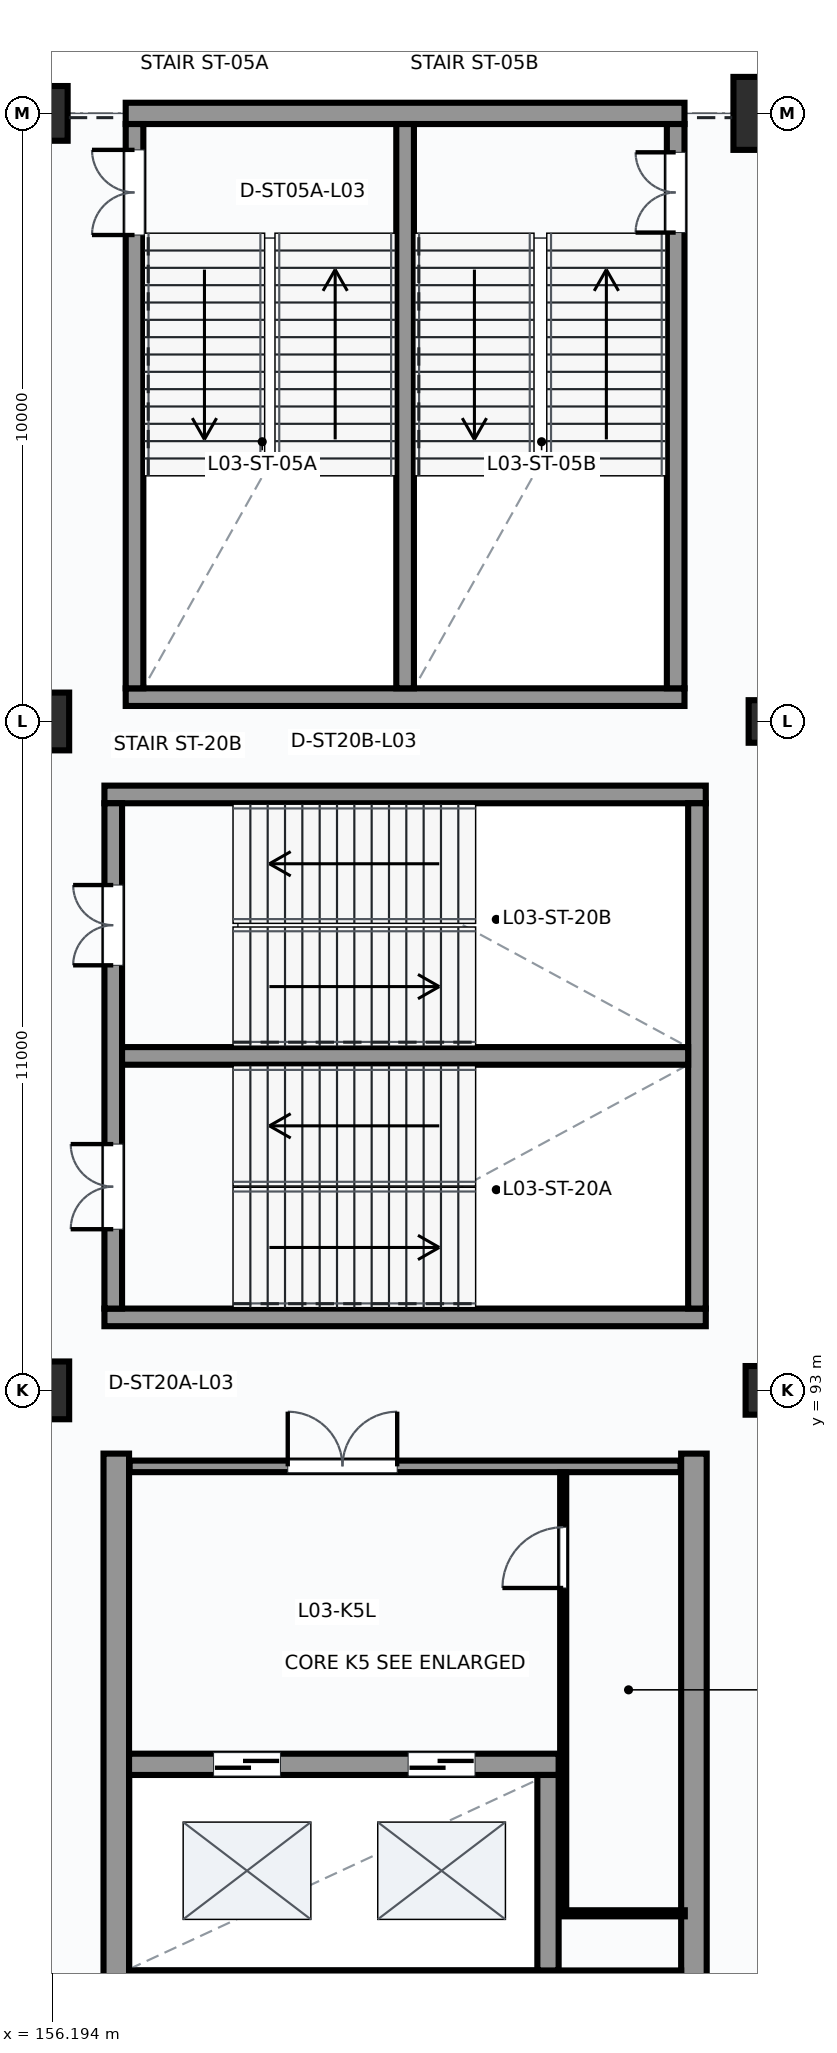
"""IFC4 building model, lengths in metres.
Left out: names, types, materials, properties, quantities, classifications, styles, units other than length and angle.
Written with IfcOpenShell. Run it as: python <this file> out.ifc"""

import sys

from ifc_helpers import new_model, si_unit, direction, frame, frame_2d, origin, origin_2d, place, context, subcontext, project, spatial, rectangle, circle, extrude, element, fill, save


model = new_model("IFC4")
c1 = context("Model", 3, precision=1e-05, world=origin(), true_north=direction((0.0, 1.0)))
c2 = subcontext(c1, "Body", "Model", "MODEL_VIEW")
j1 = project(units=[si_unit("LENGTHUNIT", "METRE"), si_unit("PLANEANGLEUNIT", "RADIAN")], contexts=[c1])
p1 = place(None, origin())
s1 = spatial("IfcSite", under=j1, at=p1, CompositionType="ELEMENT")
p2 = place(p1, origin())
s2 = spatial("IfcBuilding", under=s1, at=p2, CompositionType="ELEMENT")
p3 = place(p2, frame((0.0, 0.0, 14.7)))
s3 = spatial("IfcBuildingStorey", under=s2, at=p3, CompositionType="ELEMENT", Elevation=14.7)
for number, where, z_axis, x_axis in (
    (1, (156.0, 93.0, 0.0), (0.0, 0.0, 1.0), (1.0, 0.0, 0.0)),
    (2, (156.0, 104.0, 0.0), (0.0, 0.0, 1.0), (1.0, 0.0, 0.0)),
):
    element("IfcColumn", number, at=place(p3, frame(where, z_axis=z_axis, x_axis=x_axis)), inside=s3, PredefinedType="COLUMN", context=c2, shape_type="SweptSolid", body=[
        extrude(rectangle(XDim=0.95, YDim=0.95, at=origin_2d()), origin(), (0.0, 0.0, 1.0), 4.5),
    ])
p4 = place(p3, frame((156.0, 114.0, 0.0), z_axis=(0.0, 0.0, 1.0), x_axis=(1.0, 0.0, 0.0)))
e3 = element("IfcColumn", 3, at=p4, inside=s3, PredefinedType="COLUMN", context=c2, shape_type="SweptSolid", body=[
    extrude(circle(Radius=0.45, at=origin_2d()), origin(), (0.0, 0.0, 1.0), 4.5),
])
p5 = place(p3, frame((168.0, 93.0, 0.0), z_axis=(0.0, 0.0, 1.0), x_axis=(1.0, 0.0, 0.0)))
e4 = element("IfcColumn", 4, at=p5, inside=s3, PredefinedType="COLUMN", context=c2, shape_type="SweptSolid", body=[
    extrude(circle(Radius=0.4, at=origin_2d()), origin(), (0.0, 0.0, 1.0), 4.5),
])
p6 = place(p3, frame((168.0, 104.0, 0.0), z_axis=(0.0, 0.0, 1.0), x_axis=(1.0, 0.0, 0.0)))
e5 = element("IfcColumn", 5, at=p6, inside=s3, PredefinedType="COLUMN", context=c2, shape_type="SweptSolid", body=[
    extrude(circle(Radius=0.35, at=origin_2d()), origin(), (0.0, 0.0, 1.0), 4.5),
])
p7 = place(p3, frame((168.0, 114.0, 0.0), z_axis=(0.0, 0.0, 1.0), x_axis=(1.0, 0.0, 0.0)))
e6 = element("IfcColumn", 6, at=p7, inside=s3, PredefinedType="COLUMN", context=c2, shape_type="SweptSolid", body=[
    extrude(rectangle(XDim=1.2, YDim=1.2, at=origin_2d()), origin(), (0.0, 0.0, 1.0), 4.5),
])
p8 = place(p3, frame((157.405, 104.4, 0.0), z_axis=(0.0, 0.0, 1.0), x_axis=(1.0, 0.0, 0.0)))
e7 = element("IfcWall", 7, at=p8, inside=s3, PredefinedType="SHEAR", context=c2, shape_type="SweptSolid", body=[
    extrude(rectangle(XDim=9.19, YDim=0.29, at=frame_2d((4.595, 0.0))), origin(), (0.0, 0.0, 1.0), 4.5),
])
p9 = place(p3, frame((157.405, 114.0, 0.0), z_axis=(0.0, 0.0, 1.0), x_axis=(1.0, 0.0, 0.0)))
e8 = element("IfcWall", 8, at=p9, inside=s3, PredefinedType="SHEAR", context=c2, shape_type="SweptSolid", body=[
    extrude(rectangle(XDim=9.19, YDim=0.35, at=frame_2d((4.595, 0.0))), origin(), (0.0, 0.0, 1.0), 3.447),
])
p10 = place(p3, frame((157.55, 104.545, 0.0), z_axis=(0.0, 0.0, 1.0), x_axis=(0.0, 1.0, 0.0)))
e9 = element("IfcWall", 9, at=p10, inside=s3, PredefinedType="SHEAR", context=c2, shape_type="SweptSolid", body=[
    extrude(rectangle(XDim=9.28, YDim=0.29, at=frame_2d((4.64, 0.0))), origin(), (0.0, 0.0, 1.0), 4.5),
])
p11 = place(p10, frame((7.455, 0.0, 0.0)))
e10 = element("IfcOpeningElement", 10, at=p11, cuts=e9, PredefinedType="OPENING", context=c2, shape_type="SweptSolid", body=[
    extrude(rectangle(XDim=1.4, YDim=2.2, at=frame_2d((0.7, 1.1))), frame((0.0, 0.155, 0.0), z_axis=(0.0, -1.0, 0.0), x_axis=(1.0, 0.0, 0.0)), (0.0, 0.0, 1.0), 0.31),
])
p12 = place(p3, frame((166.45, 104.545, 0.0), z_axis=(0.0, 0.0, 1.0), x_axis=(0.0, 1.0, 0.0)))
e11 = element("IfcWall", 11, at=p12, inside=s3, PredefinedType="SHEAR", context=c2, shape_type="SweptSolid", body=[
    extrude(rectangle(XDim=9.28, YDim=0.29, at=frame_2d((4.64, 0.0))), origin(), (0.0, 0.0, 1.0), 4.5),
])
p13 = place(p12, frame((7.495, 0.0, 0.0)))
e12 = element("IfcOpeningElement", 12, at=p13, cuts=e11, PredefinedType="OPENING", context=c2, shape_type="SweptSolid", body=[
    extrude(rectangle(XDim=1.32, YDim=2.2, at=frame_2d((0.66, 1.1))), frame((0.0, 0.155, 0.0), z_axis=(0.0, -1.0, 0.0), x_axis=(1.0, 0.0, 0.0)), (0.0, 0.0, 1.0), 0.31),
])
p14 = place(p3, frame((162.0, 104.545, 0.0), z_axis=(0.0, 0.0, 1.0), x_axis=(0.0, 1.0, 0.0)))
e13 = element("IfcWall", 13, at=p14, inside=s3, PredefinedType="SHEAR", context=c2, shape_type="SweptSolid", body=[
    extrude(rectangle(XDim=9.28, YDim=0.29, at=frame_2d((4.64, 0.0))), origin(), (0.0, 0.0, 1.0), 4.5),
])
for number, where, z_axis, x_axis in (
    (14, (157.055, 94.2, 0.0), (0.0, 0.0, 1.0), (1.0, 0.0, 0.0)),
    (15, (157.055, 102.8, 0.0), (0.0, 0.0, 1.0), (1.0, 0.0, 0.0)),
):
    element("IfcWall", number, at=place(p3, frame(where, z_axis=z_axis, x_axis=x_axis)), inside=s3, PredefinedType="SHEAR", context=c2, shape_type="SweptSolid", body=[
        extrude(rectangle(XDim=9.89, YDim=0.29, at=frame_2d((4.945, 0.0))), origin(), (0.0, 0.0, 1.0), 4.5),
    ])
p15 = place(p3, frame((157.2, 94.345, 0.0), z_axis=(0.0, 0.0, 1.0), x_axis=(0.0, 1.0, 0.0)))
e16 = element("IfcWall", 16, at=p15, inside=s3, PredefinedType="SHEAR", context=c2, shape_type="SweptSolid", body=[
    extrude(rectangle(XDim=8.31, YDim=0.29, at=frame_2d((4.155, 0.0))), origin(), (0.0, 0.0, 1.0), 4.5),
])
p16 = place(p15, frame((1.305, 0.0, 0.0)))
e17 = element("IfcOpeningElement", 17, at=p16, cuts=e16, PredefinedType="OPENING", context=c2, shape_type="SweptSolid", body=[
    extrude(rectangle(XDim=1.4, YDim=2.2, at=frame_2d((0.7, 1.1))), frame((0.0, 0.155, 0.0), z_axis=(0.0, -1.0, 0.0), x_axis=(1.0, 0.0, 0.0)), (0.0, 0.0, 1.0), 0.31),
])
p17 = place(p15, frame((5.645, 0.0, 0.0)))
e18 = element("IfcOpeningElement", 18, at=p17, cuts=e16, PredefinedType="OPENING", context=c2, shape_type="SweptSolid", body=[
    extrude(rectangle(XDim=1.32, YDim=2.2, at=frame_2d((0.66, 1.1))), frame((0.0, 0.155, 0.0), z_axis=(0.0, -1.0, 0.0), x_axis=(1.0, 0.0, 0.0)), (0.0, 0.0, 1.0), 0.31),
])
p18 = place(p3, frame((166.8, 94.345, 0.0), z_axis=(0.0, 0.0, 1.0), x_axis=(0.0, 1.0, 0.0)))
e19 = element("IfcWall", 19, at=p18, inside=s3, PredefinedType="SHEAR", context=c2, shape_type="SweptSolid", body=[
    extrude(rectangle(XDim=8.31, YDim=0.29, at=frame_2d((4.155, 0.0))), origin(), (0.0, 0.0, 1.0), 4.5),
])
p19 = place(p3, frame((157.345, 98.5, 0.0), z_axis=(0.0, 0.0, 1.0), x_axis=(1.0, 0.0, 0.0)))
e20 = element("IfcWall", 20, at=p19, inside=s3, PredefinedType="SHEAR", context=c2, shape_type="SweptSolid", body=[
    extrude(rectangle(XDim=9.31, YDim=0.29, at=frame_2d((4.655, 0.0))), origin(), (0.0, 0.0, 1.0), 4.5),
])
for number, where, z_axis, x_axis in (
    (21, (157.25, 83.04, 0.0), (0.0, 0.0, 1.0), (0.0, 1.0, 0.0)),
    (22, (166.75, 83.04, 0.0), (0.0, 0.0, 1.0), (0.0, 1.0, 0.0)),
):
    element("IfcWall", number, at=place(p3, frame(where, z_axis=z_axis, x_axis=x_axis)), inside=s3, PredefinedType="SHEAR", context=c2, shape_type="SweptSolid", body=[
        extrude(rectangle(XDim=8.92, YDim=0.42, at=frame_2d((4.46, 0.0))), origin(), (0.0, 0.0, 1.0), 4.5),
    ])
p20 = place(p3, frame((157.46, 83.25, 0.0), z_axis=(0.0, 0.0, 1.0), x_axis=(1.0, 0.0, 0.0)))
e23 = element("IfcWall", 23, at=p20, inside=s3, PredefinedType="SHEAR", context=c2, shape_type="SweptSolid", body=[
    extrude(rectangle(XDim=9.08, YDim=0.42, at=frame_2d((4.54, 0.0))), origin(), (0.0, 0.0, 1.0), 4.5),
])
p21 = place(p3, frame((157.46, 86.85, 0.0), z_axis=(0.0, 0.0, 1.0), x_axis=(1.0, 0.0, 0.0)))
e24 = element("IfcWall", 24, at=p21, inside=s3, PredefinedType="SHEAR", context=c2, shape_type="SweptSolid", body=[
    extrude(rectangle(XDim=7.065, YDim=0.35, at=frame_2d((3.532, 0.0))), origin(), (0.0, 0.0, 1.0), 4.5),
])
p22 = place(p21, frame((1.39, 0.0, 0.0)))
e25 = element("IfcOpeningElement", 25, at=p22, cuts=e24, PredefinedType="OPENING", context=c2, shape_type="SweptSolid", body=[
    extrude(rectangle(XDim=1.1, YDim=2.2, at=frame_2d((0.55, 1.1))), frame((0.0, 0.185, 0.0), z_axis=(0.0, -1.0, 0.0), x_axis=(1.0, 0.0, 0.0)), (0.0, 0.0, 1.0), 0.37),
])
p23 = place(p21, frame((4.59, 0.0, 0.0)))
e26 = element("IfcOpeningElement", 26, at=p23, cuts=e24, PredefinedType="OPENING", context=c2, shape_type="SweptSolid", body=[
    extrude(rectangle(XDim=1.1, YDim=2.2, at=frame_2d((0.55, 1.1))), frame((0.0, 0.185, 0.0), z_axis=(0.0, -1.0, 0.0), x_axis=(1.0, 0.0, 0.0)), (0.0, 0.0, 1.0), 0.37),
])
p24 = place(p3, frame((164.35, 83.46, 0.0), z_axis=(0.0, 0.0, 1.0), x_axis=(0.0, 1.0, 0.0)))
e27 = element("IfcWall", 27, at=p24, inside=s3, PredefinedType="SHEAR", context=c2, shape_type="SweptSolid", body=[
    extrude(rectangle(XDim=3.215, YDim=0.35, at=frame_2d((1.607, 0.0))), origin(), (0.0, 0.0, 1.0), 4.5),
])
p25 = place(p3, frame((157.47, 91.75, 0.0), z_axis=(0.0, 0.0, 1.0), x_axis=(1.0, 0.0, 0.0)))
e28 = element("IfcWall", 28, at=p25, inside=s3, PredefinedType="PARTITIONING", context=c2, shape_type="SweptSolid", body=[
    extrude(rectangle(XDim=9.06, YDim=0.19, at=frame_2d((4.53, 0.0))), origin(), (0.0, 0.0, 1.0), 4.16),
])
p26 = place(p25, frame((2.6, 0.0, 0.0)))
e29 = element("IfcOpeningElement", 29, at=p26, cuts=e28, PredefinedType="OPENING", context=c2, shape_type="SweptSolid", body=[
    extrude(rectangle(XDim=1.8, YDim=2.3, at=frame_2d((0.9, 1.15))), frame((0.0, 0.105, 0.0), z_axis=(0.0, -1.0, 0.0), x_axis=(1.0, 0.0, 0.0)), (0.0, 0.0, 1.0), 0.21),
])
p27 = place(p3, frame((164.6, 84.4, 0.0), z_axis=(0.0, 0.0, 1.0), x_axis=(0.0, 1.0, 0.0)))
e30 = element("IfcWall", 30, at=p27, inside=s3, PredefinedType="PARTITIONING", context=c2, shape_type="SweptSolid", body=[
    extrude(rectangle(XDim=7.25, YDim=0.1, at=frame_2d((3.625, 0.0))), origin(), (0.0, 0.0, 1.0), 4.16),
])
p28 = place(p27, frame((5.35, 0.0, 0.0)))
e31 = element("IfcOpeningElement", 31, at=p28, cuts=e30, PredefinedType="OPENING", context=c2, shape_type="SweptSolid", body=[
    extrude(rectangle(XDim=1.0, YDim=2.1, at=frame_2d((0.5, 1.05))), frame((0.0, 0.06, 0.0), z_axis=(0.0, -1.0, 0.0), x_axis=(1.0, 0.0, 0.0)), (0.0, 0.0, 1.0), 0.12),
])
p29 = place(p3, frame((164.6, 84.4, 0.0), z_axis=(0.0, 0.0, 1.0), x_axis=(1.0, 0.0, 0.0)))
e32 = element("IfcWall", 32, at=p29, inside=s3, PredefinedType="PARTITIONING", context=c2, shape_type="SweptSolid", body=[
    extrude(rectangle(XDim=2.0, YDim=0.1, at=frame_2d((1.0, 0.0))), origin(), (0.0, 0.0, 1.0), 4.16),
])
p30 = place(p11, frame((1.4, 0.0, 0.0), z_axis=(0.0, 0.0, 1.0), x_axis=(-1.0, 0.0, 0.0)))
e33 = element("IfcDoor", 33, at=p30, inside=s3, OperationType="DOUBLE_DOOR_SINGLE_SWING", PredefinedType="DOOR", context=c2, shape_type="SweptSolid", body=[
    extrude(rectangle(XDim=1.4, YDim=2.2, at=frame_2d((0.7, 1.1))), frame((0.0, 0.025, 0.0), z_axis=(0.0, -1.0, 0.0), x_axis=(1.0, 0.0, 0.0)), (0.0, 0.0, 1.0), 0.05),
])
fill(e10, e33)
p31 = place(p13, origin())
e34 = element("IfcDoor", 34, at=p31, inside=s3, OperationType="DOUBLE_DOOR_SINGLE_SWING", PredefinedType="DOOR", context=c2, shape_type="SweptSolid", body=[
    extrude(rectangle(XDim=1.32, YDim=2.2, at=frame_2d((0.66, 1.1))), frame((0.0, 0.025, 0.0), z_axis=(0.0, -1.0, 0.0), x_axis=(1.0, 0.0, 0.0)), (0.0, 0.0, 1.0), 0.05),
])
fill(e12, e34)
p32 = place(p16, origin())
e35 = element("IfcDoor", 35, at=p32, inside=s3, OperationType="DOUBLE_DOOR_SINGLE_SWING", PredefinedType="DOOR", context=c2, shape_type="SweptSolid", body=[
    extrude(rectangle(XDim=1.4, YDim=2.2, at=frame_2d((0.7, 1.1))), frame((0.0, 0.025, 0.0), z_axis=(0.0, -1.0, 0.0), x_axis=(1.0, 0.0, 0.0)), (0.0, 0.0, 1.0), 0.05),
])
fill(e17, e35)
p33 = place(p17, origin())
e36 = element("IfcDoor", 36, at=p33, inside=s3, OperationType="DOUBLE_DOOR_SINGLE_SWING", PredefinedType="DOOR", context=c2, shape_type="SweptSolid", body=[
    extrude(rectangle(XDim=1.32, YDim=2.2, at=frame_2d((0.66, 1.1))), frame((0.0, 0.025, 0.0), z_axis=(0.0, -1.0, 0.0), x_axis=(1.0, 0.0, 0.0)), (0.0, 0.0, 1.0), 0.05),
])
fill(e18, e36)
p34 = place(p22, origin())
e37 = element("IfcDoor", 37, at=p34, inside=s3, OperationType="SLIDING_TO_LEFT", PredefinedType="DOOR", context=c2, shape_type="SweptSolid", body=[
    extrude(rectangle(XDim=1.1, YDim=2.2, at=frame_2d((0.55, 1.1))), frame((0.0, 0.025, 0.0), z_axis=(0.0, -1.0, 0.0), x_axis=(1.0, 0.0, 0.0)), (0.0, 0.0, 1.0), 0.05),
])
fill(e25, e37)
p35 = place(p23, origin())
e38 = element("IfcDoor", 38, at=p35, inside=s3, OperationType="SLIDING_TO_LEFT", PredefinedType="DOOR", context=c2, shape_type="SweptSolid", body=[
    extrude(rectangle(XDim=1.1, YDim=2.2, at=frame_2d((0.55, 1.1))), frame((0.0, 0.025, 0.0), z_axis=(0.0, -1.0, 0.0), x_axis=(1.0, 0.0, 0.0)), (0.0, 0.0, 1.0), 0.05),
])
fill(e26, e38)
p36 = place(p26, origin())
e39 = element("IfcDoor", 39, at=p36, inside=s3, OperationType="DOUBLE_DOOR_SINGLE_SWING", PredefinedType="DOOR", context=c2, shape_type="SweptSolid", body=[
    extrude(rectangle(XDim=1.8, YDim=2.3, at=frame_2d((0.9, 1.15))), frame((0.0, 0.025, 0.0), z_axis=(0.0, -1.0, 0.0), x_axis=(1.0, 0.0, 0.0)), (0.0, 0.0, 1.0), 0.05),
])
fill(e29, e39)
p37 = place(p28, origin())
e40 = element("IfcDoor", 40, at=p37, inside=s3, OperationType="SINGLE_SWING_LEFT", PredefinedType="DOOR", context=c2, shape_type="SweptSolid", body=[
    extrude(rectangle(XDim=1.0, YDim=2.1, at=frame_2d((0.5, 1.05))), frame((0.0, 0.025, 0.0), z_axis=(0.0, -1.0, 0.0), x_axis=(1.0, 0.0, 0.0)), (0.0, 0.0, 1.0), 0.05),
])
fill(e31, e40)
save(model, sys.argv[1])
